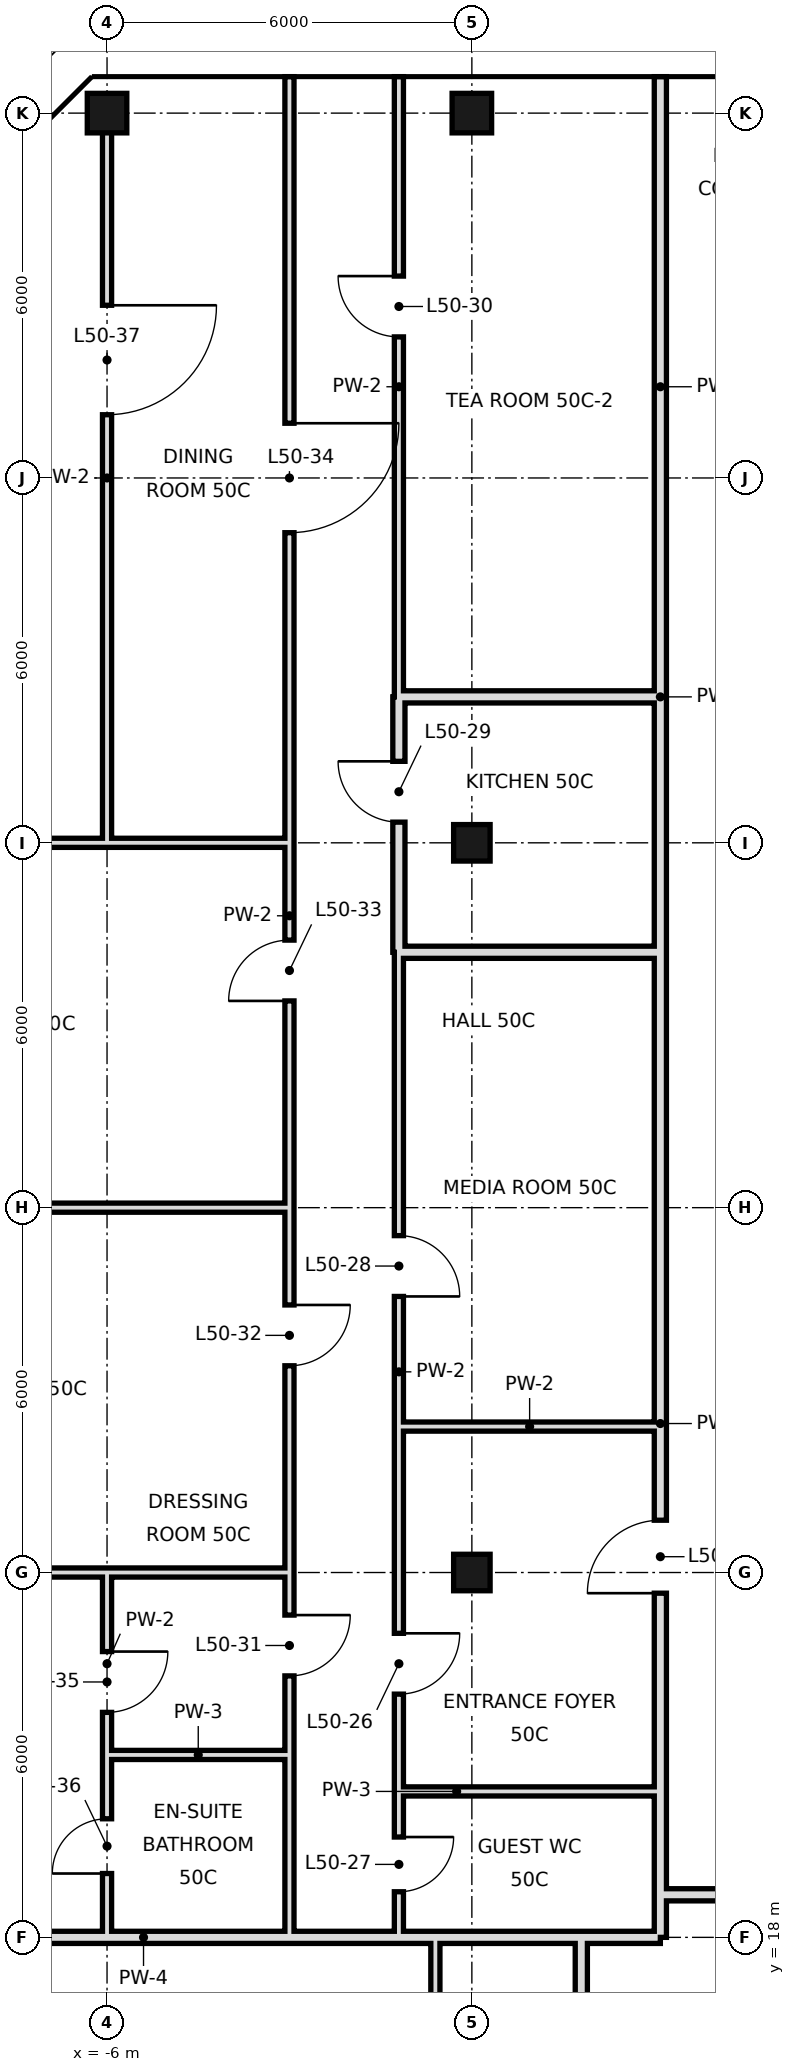
"""IFC4 building model, lengths in metres.
Left out: names, types, materials, properties, quantities, classifications, styles, units other than length and angle.
Written with IfcOpenShell. Run it as: python <this file> out.ifc"""

import sys

from ifc_helpers import new_model, si_unit, direction, frame, frame_2d, origin, origin_2d, place, context, subcontext, project, spatial, rectangle, hollow_rectangle, extrude, element, fill, save


model = new_model("IFC4")
c1 = context("Model", 3, precision=1e-05, world=origin(), true_north=direction((0.0, 1.0)))
c2 = subcontext(c1, "Body", "Model", "MODEL_VIEW")
j1 = project(units=[si_unit("LENGTHUNIT", "METRE"), si_unit("PLANEANGLEUNIT", "RADIAN")], contexts=[c1])
p1 = place(None, origin())
s1 = spatial("IfcSite", under=j1, at=p1, CompositionType="ELEMENT")
p2 = place(p1, origin())
s2 = spatial("IfcBuilding", under=s1, at=p2, CompositionType="ELEMENT")
p3 = place(p2, frame((0.0, 0.0, 215.4)))
s3 = spatial("IfcBuildingStorey", under=s2, at=p3, CompositionType="ELEMENT", Elevation=215.4)
p4 = place(p3, frame((-6.0, 48.0, 0.0), z_axis=(0.0, 0.0, 1.0), x_axis=(1.0, 0.0, 0.0)))
e1 = element("IfcColumn", 1, at=p4, inside=s3, PredefinedType="COLUMN", context=c2, shape_type="SweptSolid", body=[
    extrude(hollow_rectangle(XDim=0.65, YDim=0.65, WallThickness=0.032, at=origin_2d()), origin(), (0.0, 0.0, 1.0), 3.6),
])
for number, where, z_axis, x_axis in (
    (2, (0.0, 24.0, 0.0), (0.0, 0.0, 1.0), (1.0, 0.0, 0.0)),
    (3, (0.0, 36.0, 0.0), (0.0, 0.0, 1.0), (1.0, 0.0, 0.0)),
):
    element("IfcColumn", number, at=place(p3, frame(where, z_axis=z_axis, x_axis=x_axis)), inside=s3, PredefinedType="COLUMN", context=c2, shape_type="SweptSolid", body=[
        extrude(hollow_rectangle(XDim=0.6, YDim=0.6, WallThickness=0.028, at=origin_2d()), origin(), (0.0, 0.0, 1.0), 3.6),
    ])
p5 = place(p3, frame((0.0, 48.0, 0.0), z_axis=(0.0, 0.0, 1.0), x_axis=(1.0, 0.0, 0.0)))
e4 = element("IfcColumn", 4, at=p5, inside=s3, PredefinedType="COLUMN", context=c2, shape_type="SweptSolid", body=[
    extrude(hollow_rectangle(XDim=0.65, YDim=0.65, WallThickness=0.032, at=origin_2d()), origin(), (0.0, 0.0, 1.0), 3.6),
])
p6 = place(p3, frame((-0.6, 10.8, 0.0), z_axis=(0.0, 0.0, 1.0), x_axis=(0.0, 1.0, 0.0)))
e5 = element("IfcWall", 5, at=p6, inside=s3, PredefinedType="PARTITIONING", context=c2, shape_type="SweptSolid", body=[
    extrude(rectangle(XDim=7.2, YDim=0.15, at=frame_2d((3.6, 0.0))), origin(), (0.0, 0.0, 1.0), 3.42),
])
p7 = place(p3, frame((-1.2, 34.2, 0.0), z_axis=(0.0, 0.0, 1.0), x_axis=(0.0, 1.0, 0.0)))
e6 = element("IfcWall", 6, at=p7, inside=s3, PredefinedType="SOLIDWALL", context=c2, shape_type="SweptSolid", body=[
    extrude(rectangle(XDim=4.2, YDim=0.2, at=frame_2d((2.1, 0.0))), origin(), (0.0, 0.0, 1.0), 2.72),
])
p8 = place(p7, frame((2.14, 0.0, 0.0)))
e7 = element("IfcOpeningElement", 7, at=p8, cuts=e6, PredefinedType="OPENING", context=c2, shape_type="SweptSolid", body=[
    extrude(rectangle(XDim=1.0, YDim=2.4, at=frame_2d((0.5, 1.2))), frame((0.0, 0.11, 0.0), z_axis=(0.0, -1.0, 0.0), x_axis=(1.0, 0.0, 0.0)), (0.0, 0.0, 1.0), 0.22),
])
p9 = place(p3, frame((-1.2, 20.4, 0.0), z_axis=(0.0, 0.0, 1.0), x_axis=(0.0, 1.0, 0.0)))
e8 = element("IfcWall", 8, at=p9, inside=s3, PredefinedType="PARTITIONING", context=c2, shape_type="SweptSolid", body=[
    extrude(rectangle(XDim=13.8, YDim=0.15, at=frame_2d((6.9, 0.0))), origin(), (0.0, 0.0, 1.0), 3.42),
])
p10 = place(p9, frame((1.6, 0.0, 0.0)))
e9 = element("IfcOpeningElement", 9, at=p10, cuts=e8, PredefinedType="OPENING", context=c2, shape_type="SweptSolid", body=[
    extrude(rectangle(XDim=1.0, YDim=2.4, at=frame_2d((0.5, 1.2))), frame((0.0, 0.085, 0.0), z_axis=(0.0, -1.0, 0.0), x_axis=(1.0, 0.0, 0.0)), (0.0, 0.0, 1.0), 0.17),
])
p11 = place(p9, frame((8.14, 0.0, 0.0)))
e10 = element("IfcOpeningElement", 10, at=p11, cuts=e8, PredefinedType="OPENING", context=c2, shape_type="SweptSolid", body=[
    extrude(rectangle(XDim=1.0, YDim=2.4, at=frame_2d((0.5, 1.2))), frame((0.0, 0.085, 0.0), z_axis=(0.0, -1.0, 0.0), x_axis=(1.0, 0.0, 0.0)), (0.0, 0.0, 1.0), 0.17),
])
p12 = place(p3, frame((-1.2, 38.4, 0.0), z_axis=(0.0, 0.0, 1.0), x_axis=(0.0, 1.0, 0.0)))
e11 = element("IfcWall", 11, at=p12, inside=s3, PredefinedType="PARTITIONING", context=c2, shape_type="SweptSolid", body=[
    extrude(rectangle(XDim=10.2, YDim=0.15, at=frame_2d((5.1, 0.0))), origin(), (0.0, 0.0, 1.0), 3.42),
])
p13 = place(p12, frame((5.92, 0.0, 0.0)))
e12 = element("IfcOpeningElement", 12, at=p13, cuts=e11, PredefinedType="OPENING", context=c2, shape_type="SweptSolid", body=[
    extrude(rectangle(XDim=1.0, YDim=2.4, at=frame_2d((0.5, 1.2))), frame((0.0, 0.085, 0.0), z_axis=(0.0, -1.0, 0.0), x_axis=(1.0, 0.0, 0.0)), (0.0, 0.0, 1.0), 0.17),
])
p14 = place(p3, frame((-1.2, 18.0, 0.0), z_axis=(0.0, 0.0, 1.0), x_axis=(0.0, 1.0, 0.0)))
e13 = element("IfcWall", 13, at=p14, inside=s3, PredefinedType="PARTITIONING", context=c2, shape_type="SweptSolid", body=[
    extrude(rectangle(XDim=2.4, YDim=0.15, at=frame_2d((1.2, 0.0))), origin(), (0.0, 0.0, 1.0), 3.42),
])
p15 = place(p14, frame((0.75, 0.0, 0.0)))
e14 = element("IfcOpeningElement", 14, at=p15, cuts=e13, PredefinedType="OPENING", context=c2, shape_type="SweptSolid", body=[
    extrude(rectangle(XDim=0.9, YDim=2.4, at=frame_2d((0.45, 1.2))), frame((0.0, 0.085, 0.0), z_axis=(0.0, -1.0, 0.0), x_axis=(1.0, 0.0, 0.0)), (0.0, 0.0, 1.0), 0.17),
])
p16 = place(p3, frame((-3.0, 21.0, 0.0), z_axis=(0.0, 0.0, 1.0), x_axis=(0.0, 1.0, 0.0)))
e15 = element("IfcWall", 15, at=p16, inside=s3, PredefinedType="PARTITIONING", context=c2, shape_type="SweptSolid", body=[
    extrude(rectangle(XDim=27.6, YDim=0.15, at=frame_2d((13.8, 0.0))), origin(), (0.0, 0.0, 1.0), 3.42),
])
p17 = place(p16, frame((1.3, 0.0, 0.0)))
e16 = element("IfcOpeningElement", 16, at=p17, cuts=e15, PredefinedType="OPENING", context=c2, shape_type="SweptSolid", body=[
    extrude(rectangle(XDim=1.0, YDim=2.4, at=frame_2d((0.5, 1.2))), frame((0.0, 0.085, 0.0), z_axis=(0.0, -1.0, 0.0), x_axis=(1.0, 0.0, 0.0)), (0.0, 0.0, 1.0), 0.17),
])
p18 = place(p16, frame((6.4, 0.0, 0.0)))
e17 = element("IfcOpeningElement", 17, at=p18, cuts=e15, PredefinedType="OPENING", context=c2, shape_type="SweptSolid", body=[
    extrude(rectangle(XDim=1.0, YDim=2.4, at=frame_2d((0.5, 1.2))), frame((0.0, 0.085, 0.0), z_axis=(0.0, -1.0, 0.0), x_axis=(1.0, 0.0, 0.0)), (0.0, 0.0, 1.0), 0.17),
])
p19 = place(p16, frame((12.4, 0.0, 0.0)))
e18 = element("IfcOpeningElement", 18, at=p19, cuts=e15, PredefinedType="OPENING", context=c2, shape_type="SweptSolid", body=[
    extrude(rectangle(XDim=1.0, YDim=2.4, at=frame_2d((0.5, 1.2))), frame((0.0, 0.085, 0.0), z_axis=(0.0, -1.0, 0.0), x_axis=(1.0, 0.0, 0.0)), (0.0, 0.0, 1.0), 0.17),
])
p20 = place(p16, frame((20.1, 0.0, 0.0)))
e19 = element("IfcOpeningElement", 19, at=p20, cuts=e15, PredefinedType="OPENING", context=c2, shape_type="SweptSolid", body=[
    extrude(rectangle(XDim=1.8, YDim=2.4, at=frame_2d((0.9, 1.2))), frame((0.0, 0.085, 0.0), z_axis=(0.0, -1.0, 0.0), x_axis=(1.0, 0.0, 0.0)), (0.0, 0.0, 1.0), 0.17),
])
p21 = place(p3, frame((-3.0, 18.0, 0.0), z_axis=(0.0, 0.0, 1.0), x_axis=(0.0, 1.0, 0.0)))
e20 = element("IfcWall", 20, at=p21, inside=s3, PredefinedType="PARTITIONING", context=c2, shape_type="SweptSolid", body=[
    extrude(rectangle(XDim=3.0, YDim=0.15, at=frame_2d((1.5, 0.0))), origin(), (0.0, 0.0, 1.0), 3.42),
])
p22 = place(p3, frame((-6.0, 21.0, 0.0), z_axis=(0.0, 0.0, 1.0), x_axis=(0.0, 1.0, 0.0)))
e21 = element("IfcWall", 21, at=p22, inside=s3, PredefinedType="PARTITIONING", context=c2, shape_type="SweptSolid", body=[
    extrude(rectangle(XDim=3.0, YDim=0.15, at=frame_2d((1.5, 0.0))), origin(), (0.0, 0.0, 1.0), 3.42),
])
p23 = place(p22, frame((0.7, 0.0, 0.0)))
e22 = element("IfcOpeningElement", 22, at=p23, cuts=e21, PredefinedType="OPENING", context=c2, shape_type="SweptSolid", body=[
    extrude(rectangle(XDim=1.0, YDim=2.4, at=frame_2d((0.5, 1.2))), frame((0.0, 0.085, 0.0), z_axis=(0.0, -1.0, 0.0), x_axis=(1.0, 0.0, 0.0)), (0.0, 0.0, 1.0), 0.17),
])
p24 = place(p3, frame((-6.0, 36.0, 0.0), z_axis=(0.0, 0.0, 1.0), x_axis=(0.0, 1.0, 0.0)))
e23 = element("IfcWall", 23, at=p24, inside=s3, PredefinedType="PARTITIONING", context=c2, shape_type="SweptSolid", body=[
    extrude(rectangle(XDim=12.0, YDim=0.15, at=frame_2d((6.0, 0.0))), origin(), (0.0, 0.0, 1.0), 3.42),
])
p25 = place(p24, frame((7.04, 0.0, 0.0)))
e24 = element("IfcOpeningElement", 24, at=p25, cuts=e23, PredefinedType="OPENING", context=c2, shape_type="SweptSolid", body=[
    extrude(rectangle(XDim=1.8, YDim=2.4, at=frame_2d((0.9, 1.2))), frame((0.0, 0.085, 0.0), z_axis=(0.0, -1.0, 0.0), x_axis=(1.0, 0.0, 0.0)), (0.0, 0.0, 1.0), 0.17),
])
p26 = place(p3, frame((-6.0, 18.0, 0.0), z_axis=(0.0, 0.0, 1.0), x_axis=(0.0, 1.0, 0.0)))
e25 = element("IfcWall", 25, at=p26, inside=s3, PredefinedType="PARTITIONING", context=c2, shape_type="SweptSolid", body=[
    extrude(rectangle(XDim=3.0, YDim=0.15, at=frame_2d((1.5, 0.0))), origin(), (0.0, 0.0, 1.0), 3.42),
])
p27 = place(p26, frame((1.05, 0.0, 0.0)))
e26 = element("IfcOpeningElement", 26, at=p27, cuts=e25, PredefinedType="OPENING", context=c2, shape_type="SweptSolid", body=[
    extrude(rectangle(XDim=0.9, YDim=2.4, at=frame_2d((0.45, 1.2))), frame((0.0, 0.085, 0.0), z_axis=(0.0, -1.0, 0.0), x_axis=(1.0, 0.0, 0.0)), (0.0, 0.0, 1.0), 0.17),
])
p28 = place(p3, frame((1.8, 10.8, 0.0), z_axis=(0.0, 0.0, 1.0), x_axis=(0.0, 1.0, 0.0)))
e27 = element("IfcWall", 27, at=p28, inside=s3, PredefinedType="SOLIDWALL", context=c2, shape_type="SweptSolid", body=[
    extrude(rectangle(XDim=7.2, YDim=0.2, at=frame_2d((3.6, 0.0))), origin(), (0.0, 0.0, 1.0), 3.42),
])
p29 = place(p3, frame((3.1, 18.7, 0.0), z_axis=(0.0, 0.0, 1.0), x_axis=(0.0, 1.0, 0.0)))
e28 = element("IfcWall", 28, at=p29, inside=s3, PredefinedType="SOLIDWALL", context=c2, shape_type="SweptSolid", body=[
    extrude(rectangle(XDim=15.5, YDim=0.2, at=frame_2d((7.75, 0.0))), origin(), (0.0, 0.0, 1.0), 2.97),
])
p30 = place(p29, frame((4.96, 0.0, 0.0)))
e29 = element("IfcOpeningElement", 29, at=p30, cuts=e28, PredefinedType="OPENING", context=c2, shape_type="SweptSolid", body=[
    extrude(rectangle(XDim=1.2, YDim=2.4, at=frame_2d((0.6, 1.2))), frame((0.0, 0.11, 0.0), z_axis=(0.0, -1.0, 0.0), x_axis=(1.0, 0.0, 0.0)), (0.0, 0.0, 1.0), 0.22),
])
p31 = place(p3, frame((3.1, 38.4, 0.0), z_axis=(0.0, 0.0, 1.0), x_axis=(0.0, 1.0, 0.0)))
e30 = element("IfcWall", 30, at=p31, inside=s3, PredefinedType="SOLIDWALL", context=c2, shape_type="SweptSolid", body=[
    extrude(rectangle(XDim=10.2, YDim=0.2, at=frame_2d((5.1, 0.0))), origin(), (0.0, 0.0, 1.0), 2.72),
])
p32 = place(p3, frame((3.1, 18.0, 0.0), z_axis=(0.0, 0.0, 1.0), x_axis=(0.0, 1.0, 0.0)))
e31 = element("IfcWall", 31, at=p32, inside=s3, PredefinedType="SOLIDWALL", context=c2, shape_type="SweptSolid", body=[
    extrude(rectangle(XDim=0.7, YDim=0.2, at=frame_2d((0.35, 0.0))), origin(), (0.0, 0.0, 1.0), 2.97),
])
p33 = place(p3, frame((3.1, 34.2, 0.0), z_axis=(0.0, 0.0, 1.0), x_axis=(0.0, 1.0, 0.0)))
e32 = element("IfcWall", 32, at=p33, inside=s3, PredefinedType="SOLIDWALL", context=c2, shape_type="SweptSolid", body=[
    extrude(rectangle(XDim=4.2, YDim=0.2, at=frame_2d((2.1, 0.0))), origin(), (0.0, 0.0, 1.0), 3.42),
])
p34 = place(p3, frame((1.8, 18.0, 0.0), z_axis=(0.0, 0.0, 1.0), x_axis=(1.0, 0.0, 0.0)))
e33 = element("IfcWall", 33, at=p34, inside=s3, PredefinedType="SOLIDWALL", context=c2, shape_type="SweptSolid", body=[
    extrude(rectangle(XDim=1.3, YDim=0.2, at=frame_2d((0.65, 0.0))), origin(), (0.0, 0.0, 1.0), 2.97),
])
p35 = place(p3, frame((-12.6, 18.0, 0.0), z_axis=(0.0, 0.0, 1.0), x_axis=(1.0, 0.0, 0.0)))
e34 = element("IfcWall", 34, at=p35, inside=s3, PredefinedType="SOLIDWALL", context=c2, shape_type="SweptSolid", body=[
    extrude(rectangle(XDim=14.4, YDim=0.2, at=frame_2d((7.2, 0.0))), origin(), (0.0, 0.0, 1.0), 2.72),
])
p36 = place(p3, frame((3.1, 18.7, 0.0), z_axis=(0.0, 0.0, 1.0), x_axis=(1.0, 0.0, 0.0)))
e35 = element("IfcWall", 35, at=p36, inside=s3, PredefinedType="SOLIDWALL", context=c2, shape_type="SweptSolid", body=[
    extrude(rectangle(XDim=4.1, YDim=0.2, at=frame_2d((2.05, 0.0))), origin(), (0.0, 0.0, 1.0), 2.72),
])
p37 = place(p3, frame((-1.2, 20.4, 0.0), z_axis=(0.0, 0.0, 1.0), x_axis=(1.0, 0.0, 0.0)))
e36 = element("IfcWall", 36, at=p37, inside=s3, PredefinedType="PARTITIONING", context=c2, shape_type="SweptSolid", body=[
    extrude(rectangle(XDim=4.3, YDim=0.15, at=frame_2d((2.15, 0.0))), origin(), (0.0, 0.0, 1.0), 3.42),
])
p38 = place(p3, frame((-6.0, 21.0, 0.0), z_axis=(0.0, 0.0, 1.0), x_axis=(1.0, 0.0, 0.0)))
e37 = element("IfcWall", 37, at=p38, inside=s3, PredefinedType="PARTITIONING", context=c2, shape_type="SweptSolid", body=[
    extrude(rectangle(XDim=3.0, YDim=0.15, at=frame_2d((1.5, 0.0))), origin(), (0.0, 0.0, 1.0), 3.42),
])
p39 = place(p3, frame((-12.0, 24.0, 0.0), z_axis=(0.0, 0.0, 1.0), x_axis=(1.0, 0.0, 0.0)))
e38 = element("IfcWall", 38, at=p39, inside=s3, PredefinedType="PARTITIONING", context=c2, shape_type="SweptSolid", body=[
    extrude(rectangle(XDim=9.0, YDim=0.15, at=frame_2d((4.5, 0.0))), origin(), (0.0, 0.0, 1.0), 2.72),
])
p40 = place(p3, frame((-1.2, 26.4, 0.0), z_axis=(0.0, 0.0, 1.0), x_axis=(1.0, 0.0, 0.0)))
e39 = element("IfcWall", 39, at=p40, inside=s3, PredefinedType="PARTITIONING", context=c2, shape_type="SweptSolid", body=[
    extrude(rectangle(XDim=4.3, YDim=0.15, at=frame_2d((2.15, 0.0))), origin(), (0.0, 0.0, 1.0), 3.42),
])
p41 = place(p3, frame((-12.6, 30.0, 0.0), z_axis=(0.0, 0.0, 1.0), x_axis=(1.0, 0.0, 0.0)))
e40 = element("IfcWall", 40, at=p41, inside=s3, PredefinedType="PARTITIONING", context=c2, shape_type="SweptSolid", body=[
    extrude(rectangle(XDim=9.6, YDim=0.15, at=frame_2d((4.8, 0.0))), origin(), (0.0, 0.0, 1.0), 2.72),
])
p42 = place(p3, frame((-1.2, 34.2, 0.0), z_axis=(0.0, 0.0, 1.0), x_axis=(1.0, 0.0, 0.0)))
e41 = element("IfcWall", 41, at=p42, inside=s3, PredefinedType="SOLIDWALL", context=c2, shape_type="SweptSolid", body=[
    extrude(rectangle(XDim=4.3, YDim=0.2, at=frame_2d((2.15, 0.0))), origin(), (0.0, 0.0, 1.0), 2.72),
])
p43 = place(p3, frame((-12.0, 36.0, 0.0), z_axis=(0.0, 0.0, 1.0), x_axis=(1.0, 0.0, 0.0)))
e42 = element("IfcWall", 42, at=p43, inside=s3, PredefinedType="PARTITIONING", context=c2, shape_type="SweptSolid", body=[
    extrude(rectangle(XDim=9.0, YDim=0.15, at=frame_2d((4.5, 0.0))), origin(), (0.0, 0.0, 1.0), 2.72),
])
p44 = place(p3, frame((-1.2, 38.4, 0.0), z_axis=(0.0, 0.0, 1.0), x_axis=(1.0, 0.0, 0.0)))
e43 = element("IfcWall", 43, at=p44, inside=s3, PredefinedType="SOLIDWALL", context=c2, shape_type="SweptSolid", body=[
    extrude(rectangle(XDim=4.3, YDim=0.2, at=frame_2d((2.15, 0.0))), origin(), (0.0, 0.0, 1.0), 2.72),
])
p45 = place(p10, origin())
e44 = element("IfcDoor", 44, at=p45, inside=s3, OperationType="SINGLE_SWING_RIGHT", PredefinedType="DOOR", context=c2, shape_type="SweptSolid", body=[
    extrude(rectangle(XDim=1.0, YDim=2.4, at=frame_2d((0.5, 1.2))), frame((0.0, 0.025, 0.0), z_axis=(0.0, -1.0, 0.0), x_axis=(1.0, 0.0, 0.0)), (0.0, 0.0, 1.0), 0.05),
])
fill(e9, e44)
p46 = place(p15, origin())
e45 = element("IfcDoor", 45, at=p46, inside=s3, OperationType="SINGLE_SWING_RIGHT", PredefinedType="DOOR", context=c2, shape_type="SweptSolid", body=[
    extrude(rectangle(XDim=0.9, YDim=2.4, at=frame_2d((0.45, 1.2))), frame((0.0, 0.025, 0.0), z_axis=(0.0, -1.0, 0.0), x_axis=(1.0, 0.0, 0.0)), (0.0, 0.0, 1.0), 0.05),
])
fill(e14, e45)
p47 = place(p11, frame((1.0, 0.0, 0.0), z_axis=(0.0, 0.0, 1.0), x_axis=(-1.0, 0.0, 0.0)))
e46 = element("IfcDoor", 46, at=p47, inside=s3, OperationType="SINGLE_SWING_RIGHT", PredefinedType="DOOR", context=c2, shape_type="SweptSolid", body=[
    extrude(rectangle(XDim=1.0, YDim=2.4, at=frame_2d((0.5, 1.2))), frame((0.0, 0.025, 0.0), z_axis=(0.0, -1.0, 0.0), x_axis=(1.0, 0.0, 0.0)), (0.0, 0.0, 1.0), 0.05),
])
fill(e10, e46)
p48 = place(p8, frame((1.0, 0.0, 0.0), z_axis=(0.0, 0.0, 1.0), x_axis=(-1.0, 0.0, 0.0)))
e47 = element("IfcDoor", 47, at=p48, inside=s3, OperationType="SINGLE_SWING_LEFT", PredefinedType="DOOR", context=c2, shape_type="SweptSolid", body=[
    extrude(rectangle(XDim=1.0, YDim=2.4, at=frame_2d((0.5, 1.2))), frame((0.0, 0.025, 0.0), z_axis=(0.0, -1.0, 0.0), x_axis=(1.0, 0.0, 0.0)), (0.0, 0.0, 1.0), 0.05),
])
fill(e7, e47)
p49 = place(p13, frame((1.0, 0.0, 0.0), z_axis=(0.0, 0.0, 1.0), x_axis=(-1.0, 0.0, 0.0)))
e48 = element("IfcDoor", 48, at=p49, inside=s3, OperationType="SINGLE_SWING_LEFT", PredefinedType="DOOR", context=c2, shape_type="SweptSolid", body=[
    extrude(rectangle(XDim=1.0, YDim=2.4, at=frame_2d((0.5, 1.2))), frame((0.0, 0.025, 0.0), z_axis=(0.0, -1.0, 0.0), x_axis=(1.0, 0.0, 0.0)), (0.0, 0.0, 1.0), 0.05),
])
fill(e12, e48)
p50 = place(p17, origin())
e49 = element("IfcDoor", 49, at=p50, inside=s3, OperationType="SINGLE_SWING_RIGHT", PredefinedType="DOOR", context=c2, shape_type="SweptSolid", body=[
    extrude(rectangle(XDim=1.0, YDim=2.4, at=frame_2d((0.5, 1.2))), frame((0.0, 0.025, 0.0), z_axis=(0.0, -1.0, 0.0), x_axis=(1.0, 0.0, 0.0)), (0.0, 0.0, 1.0), 0.05),
])
fill(e16, e49)
p51 = place(p18, origin())
e50 = element("IfcDoor", 50, at=p51, inside=s3, OperationType="SINGLE_SWING_RIGHT", PredefinedType="DOOR", context=c2, shape_type="SweptSolid", body=[
    extrude(rectangle(XDim=1.0, YDim=2.4, at=frame_2d((0.5, 1.2))), frame((0.0, 0.025, 0.0), z_axis=(0.0, -1.0, 0.0), x_axis=(1.0, 0.0, 0.0)), (0.0, 0.0, 1.0), 0.05),
])
fill(e17, e50)
p52 = place(p19, origin())
e51 = element("IfcDoor", 51, at=p52, inside=s3, OperationType="SINGLE_SWING_LEFT", PredefinedType="DOOR", context=c2, shape_type="SweptSolid", body=[
    extrude(rectangle(XDim=1.0, YDim=2.4, at=frame_2d((0.5, 1.2))), frame((0.0, 0.025, 0.0), z_axis=(0.0, -1.0, 0.0), x_axis=(1.0, 0.0, 0.0)), (0.0, 0.0, 1.0), 0.05),
])
fill(e18, e51)
p53 = place(p20, origin())
e52 = element("IfcDoor", 52, at=p53, inside=s3, OperationType="SINGLE_SWING_RIGHT", PredefinedType="DOOR", context=c2, shape_type="SweptSolid", body=[
    extrude(rectangle(XDim=1.8, YDim=2.4, at=frame_2d((0.9, 1.2))), frame((0.0, 0.025, 0.0), z_axis=(0.0, -1.0, 0.0), x_axis=(1.0, 0.0, 0.0)), (0.0, 0.0, 1.0), 0.05),
])
fill(e19, e52)
p54 = place(p23, origin())
e53 = element("IfcDoor", 53, at=p54, inside=s3, OperationType="SINGLE_SWING_RIGHT", PredefinedType="DOOR", context=c2, shape_type="SweptSolid", body=[
    extrude(rectangle(XDim=1.0, YDim=2.4, at=frame_2d((0.5, 1.2))), frame((0.0, 0.025, 0.0), z_axis=(0.0, -1.0, 0.0), x_axis=(1.0, 0.0, 0.0)), (0.0, 0.0, 1.0), 0.05),
])
fill(e22, e53)
p55 = place(p27, origin())
e54 = element("IfcDoor", 54, at=p55, inside=s3, OperationType="SINGLE_SWING_LEFT", PredefinedType="DOOR", context=c2, shape_type="SweptSolid", body=[
    extrude(rectangle(XDim=0.9, YDim=2.4, at=frame_2d((0.45, 1.2))), frame((0.0, 0.025, 0.0), z_axis=(0.0, -1.0, 0.0), x_axis=(1.0, 0.0, 0.0)), (0.0, 0.0, 1.0), 0.05),
])
fill(e26, e54)
p56 = place(p25, origin())
e55 = element("IfcDoor", 55, at=p56, inside=s3, OperationType="SINGLE_SWING_RIGHT", PredefinedType="DOOR", context=c2, shape_type="SweptSolid", body=[
    extrude(rectangle(XDim=1.8, YDim=2.4, at=frame_2d((0.9, 1.2))), frame((0.0, 0.025, 0.0), z_axis=(0.0, -1.0, 0.0), x_axis=(1.0, 0.0, 0.0)), (0.0, 0.0, 1.0), 0.05),
])
fill(e24, e55)
p57 = place(p30, origin())
e56 = element("IfcDoor", 56, at=p57, inside=s3, OperationType="SINGLE_SWING_LEFT", PredefinedType="DOOR", context=c2, shape_type="SweptSolid", body=[
    extrude(rectangle(XDim=1.2, YDim=2.4, at=frame_2d((0.6, 1.2))), frame((0.0, 0.025, 0.0), z_axis=(0.0, -1.0, 0.0), x_axis=(1.0, 0.0, 0.0)), (0.0, 0.0, 1.0), 0.05),
])
fill(e29, e56)
save(model, sys.argv[1])
